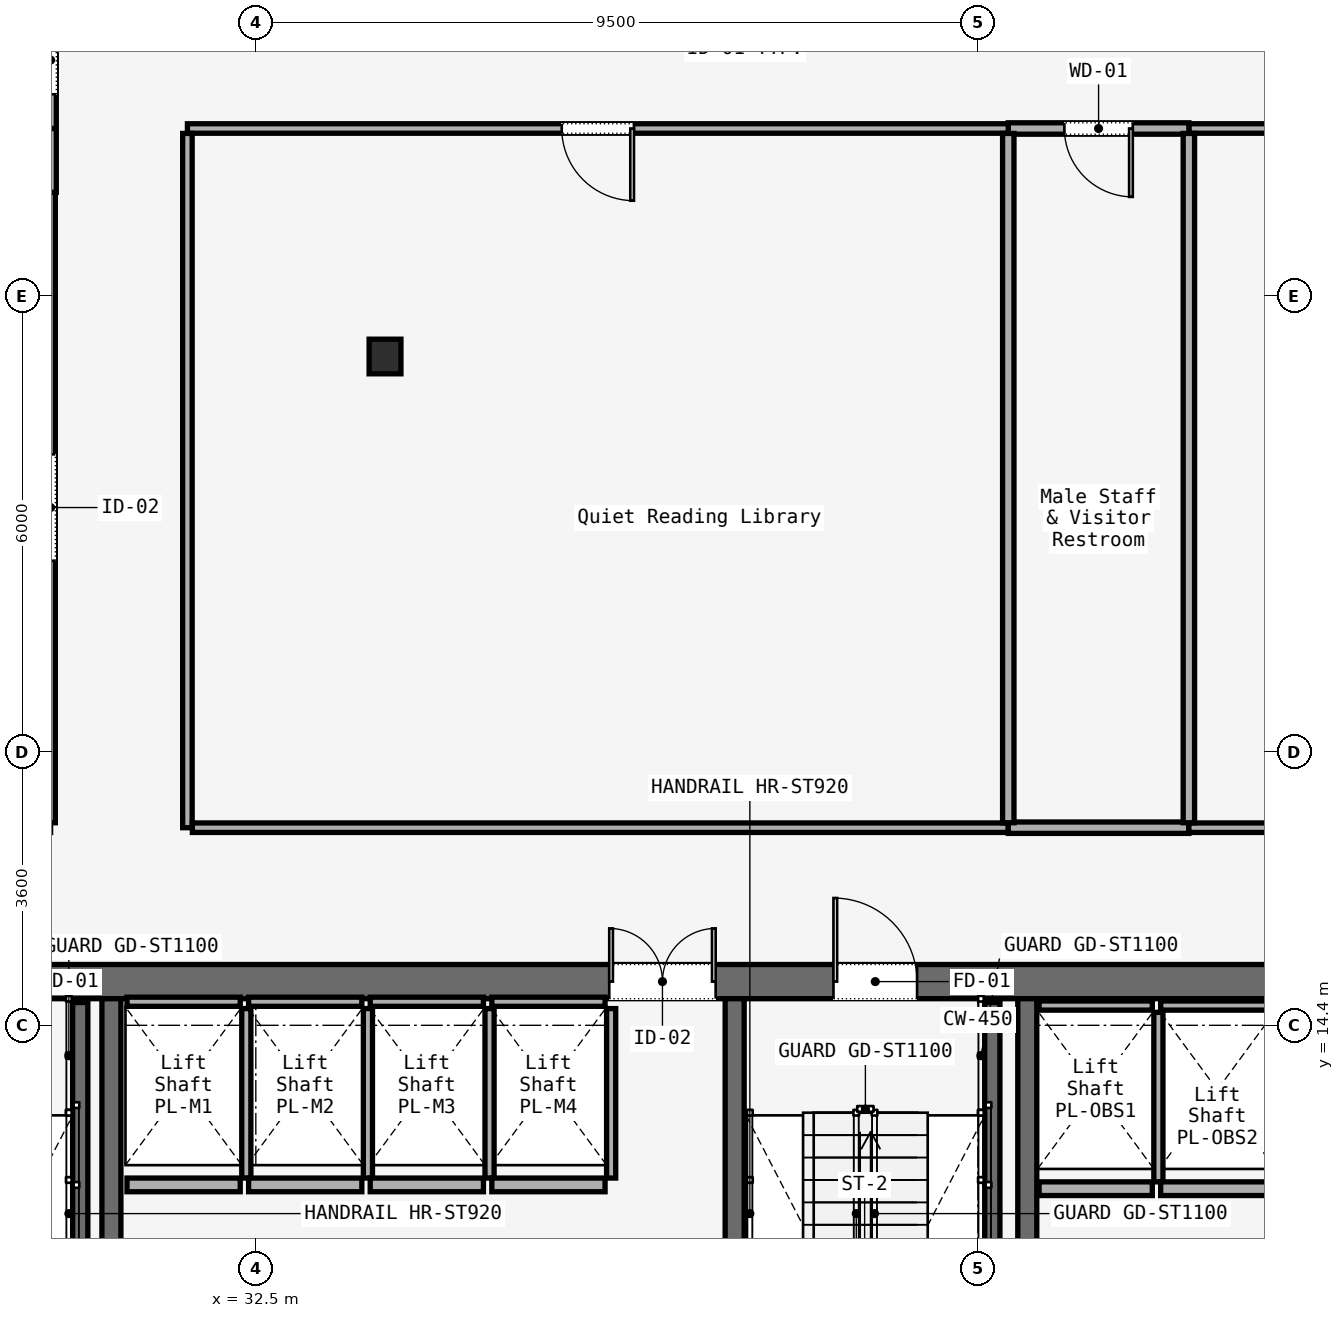
"""IFC4 building model, lengths in metres.
Left out: names, types, materials, properties, quantities, classifications, styles, units other than length and angle.
Written with IfcOpenShell. Run it as: python <this file> out.ifc"""

import sys

from ifc_helpers import new_model, si_unit, direction, frame, frame_2d, origin, origin_2d, place, context, subcontext, project, spatial, rectangle, i_section, extrude, element, fill, save


model = new_model("IFC4")
c1 = context("Model", 3, precision=1e-05, world=origin(), true_north=direction((0.0, 1.0)))
c2 = subcontext(c1, "Body", "Model", "MODEL_VIEW")
j1 = project(units=[si_unit("LENGTHUNIT", "METRE"), si_unit("PLANEANGLEUNIT", "RADIAN")], contexts=[c1])
p1 = place(None, origin())
s1 = spatial("IfcSite", under=j1, at=p1, CompositionType="ELEMENT")
p2 = place(p1, origin())
s2 = spatial("IfcBuilding", under=s1, at=p2, CompositionType="ELEMENT")
p3 = place(p2, frame((0.0, 0.0, 108.2)))
s3 = spatial("IfcBuildingStorey", under=s2, at=p3, CompositionType="ELEMENT", Elevation=108.2)
p4 = place(p3, frame((26.45, 14.975, 0.0), z_axis=(0.0, 0.0, 1.0), x_axis=(1.0, 0.0, 0.0)))
e1 = element("IfcWall", 1, at=p4, inside=s3, PredefinedType="SOLIDWALL", context=c2, shape_type="SweptSolid", body=[
    extrude(rectangle(XDim=31.1, YDim=0.45, at=frame_2d((15.55, 0.0))), origin(), (0.0, 0.0, 1.0), 3.52),
])
p5 = place(p4, frame((1.65, 0.0, 0.0)))
e2 = element("IfcOpeningElement", 2, at=p5, cuts=e1, PredefinedType="OPENING", context=c2, shape_type="SweptSolid", body=[
    extrude(rectangle(XDim=1.1, YDim=2.2, at=frame_2d((0.55, 1.1))), frame((0.0, 0.225, 0.0), z_axis=(0.0, -1.0, 0.0), x_axis=(1.0, 0.0, 0.0)), (0.0, 0.0, 1.0), 0.45),
])
p6 = place(p4, frame((13.65, 0.0, 0.0)))
e3 = element("IfcOpeningElement", 3, at=p6, cuts=e1, PredefinedType="OPENING", context=c2, shape_type="SweptSolid", body=[
    extrude(rectangle(XDim=1.1, YDim=2.2, at=frame_2d((0.55, 1.1))), frame((0.0, 0.225, 0.0), z_axis=(0.0, -1.0, 0.0), x_axis=(1.0, 0.0, 0.0)), (0.0, 0.0, 1.0), 0.45),
])
p7 = place(p4, frame((25.55, 0.0, 0.0)))
e4 = element("IfcOpeningElement", 4, at=p7, cuts=e1, PredefinedType="OPENING", context=c2, shape_type="SweptSolid", body=[
    extrude(rectangle(XDim=1.1, YDim=2.2, at=frame_2d((0.55, 1.1))), frame((0.0, 0.225, 0.0), z_axis=(0.0, -1.0, 0.0), x_axis=(1.0, 0.0, 0.0)), (0.0, 0.0, 1.0), 0.45),
])
p8 = place(p4, frame((10.7, 0.0, 0.0)))
e5 = element("IfcOpeningElement", 5, at=p8, cuts=e1, PredefinedType="OPENING", context=c2, shape_type="SweptSolid", body=[
    extrude(rectangle(XDim=1.4, YDim=2.2, at=frame_2d((0.7, 1.1))), frame((0.0, 0.225, 0.0), z_axis=(0.0, -1.0, 0.0), x_axis=(1.0, 0.0, 0.0)), (0.0, 0.0, 1.0), 0.45),
])
p9 = place(p4, frame((19.35, 0.0, 0.0)))
e6 = element("IfcOpeningElement", 6, at=p9, cuts=e1, PredefinedType="OPENING", context=c2, shape_type="SweptSolid", body=[
    extrude(rectangle(XDim=1.1, YDim=2.2, at=frame_2d((0.55, 1.1))), frame((0.0, 0.225, 0.0), z_axis=(0.0, -1.0, 0.0), x_axis=(1.0, 0.0, 0.0)), (0.0, 0.0, 1.0), 0.45),
])
p10 = place(p4, frame((21.4, 0.0, 0.0)))
e7 = element("IfcOpeningElement", 7, at=p10, cuts=e1, PredefinedType="OPENING", context=c2, shape_type="SweptSolid", body=[
    extrude(rectangle(XDim=0.9, YDim=2.1, at=frame_2d((0.45, 1.05))), frame((0.0, 0.225, 0.0), z_axis=(0.0, -1.0, 0.0), x_axis=(1.0, 0.0, 0.0)), (0.0, 0.0, 1.0), 0.45),
])
p11 = place(p4, frame((23.35, 0.0, 0.0)))
e8 = element("IfcOpeningElement", 8, at=p11, cuts=e1, PredefinedType="OPENING", context=c2, shape_type="SweptSolid", body=[
    extrude(rectangle(XDim=1.3, YDim=2.3, at=frame_2d((0.65, 1.15))), frame((0.0, 0.225, 0.0), z_axis=(0.0, -1.0, 0.0), x_axis=(1.0, 0.0, 0.0)), (0.0, 0.0, 1.0), 0.45),
])
for number, where, z_axis, x_axis in (
    (9, (30.6, 5.85, 0.0), (0.0, 0.0, 1.0), (0.0, 1.0, 0.0)),
    (10, (38.8, 5.85, 0.0), (0.0, 0.0, 1.0), (0.0, 1.0, 0.0)),
    (11, (42.65, 5.85, 0.0), (0.0, 0.0, 1.0), (0.0, 1.0, 0.0)),
):
    element("IfcWall", number, at=place(p3, frame(where, z_axis=z_axis, x_axis=x_axis)), inside=s3, PredefinedType="SOLIDWALL", context=c2, shape_type="SweptSolid", body=[
        extrude(rectangle(XDim=8.9, YDim=0.25, at=frame_2d((4.45, 0.0))), origin(), (0.0, 0.0, 1.0), 3.52),
    ])
p12 = place(p3, frame((34.2, 23.2, 0.0), z_axis=(0.0, 0.0, 1.0), x_axis=(1.0, 0.0, 0.0)))
e12 = element("IfcColumn", 12, at=p12, inside=s3, PredefinedType="COLUMN", context=c2, shape_type="SweptSolid", body=[
    extrude(i_section(OverallWidth=0.418, OverallDepth=0.456, WebThickness=0.042, FlangeThickness=0.067, FilletRadius=0.015, at=origin_2d()), origin(), (0.0, 0.0, 1.0), 3.52),
])
for number, where, z_axis, x_axis in (
    (13, (30.19, 14.7, 0.0), (0.0, 0.0, 1.0), (0.0, -1.0, 0.0)),
    (14, (42.19, 14.7, 0.0), (0.0, 0.0, 1.0), (0.0, -1.0, 0.0)),
):
    element("IfcWall", number, at=place(p3, frame(where, z_axis=z_axis, x_axis=x_axis)), inside=s3, PredefinedType="SOLIDWALL", context=c2, shape_type="SweptSolid", body=[
        extrude(rectangle(XDim=7.65, YDim=0.2, at=frame_2d((3.825, 0.0))), origin(), (0.0, 0.0, 1.0), 3.8),
    ])
p13 = place(p3, frame((30.805, 12.3, 0.0), z_axis=(0.0, 0.0, 1.0), x_axis=(1.0, 0.0, 0.0)))
e15 = element("IfcWall", 15, at=p13, inside=s3, PredefinedType="SOLIDWALL", context=c2, shape_type="SweptSolid", body=[
    extrude(rectangle(XDim=1.49, YDim=0.18, at=frame_2d((0.745, 0.0))), origin(), (0.0, 0.0, 1.0), 2.95),
])
p14 = place(p3, frame((30.805, 14.71, 0.0), z_axis=(0.0, 0.0, 1.0), x_axis=(1.0, 0.0, 0.0)))
e16 = element("IfcWall", 16, at=p14, inside=s3, PredefinedType="SOLIDWALL", context=c2, shape_type="SweptSolid", body=[
    extrude(rectangle(XDim=1.49, YDim=0.12, at=frame_2d((0.745, 0.0))), origin(), (0.0, 0.0, 1.0), 2.95),
])
p15 = place(p3, frame((32.375, 12.39, 0.0), z_axis=(0.0, 0.0, 1.0), x_axis=(0.0, 1.0, 0.0)))
e17 = element("IfcWall", 17, at=p15, inside=s3, PredefinedType="SOLIDWALL", context=c2, shape_type="SweptSolid", body=[
    extrude(rectangle(XDim=2.23, YDim=0.12, at=frame_2d((1.115, 0.0))), origin(), (0.0, 0.0, 1.0), 2.95),
])
p16 = place(p3, frame((32.405, 12.3, 0.0), z_axis=(0.0, 0.0, 1.0), x_axis=(1.0, 0.0, 0.0)))
e18 = element("IfcWall", 18, at=p16, inside=s3, PredefinedType="SOLIDWALL", context=c2, shape_type="SweptSolid", body=[
    extrude(rectangle(XDim=1.49, YDim=0.18, at=frame_2d((0.745, 0.0))), origin(), (0.0, 0.0, 1.0), 2.95),
])
p17 = place(p3, frame((32.405, 14.71, 0.0), z_axis=(0.0, 0.0, 1.0), x_axis=(1.0, 0.0, 0.0)))
e19 = element("IfcWall", 19, at=p17, inside=s3, PredefinedType="SOLIDWALL", context=c2, shape_type="SweptSolid", body=[
    extrude(rectangle(XDim=1.49, YDim=0.12, at=frame_2d((0.745, 0.0))), origin(), (0.0, 0.0, 1.0), 2.95),
])
p18 = place(p3, frame((33.975, 12.39, 0.0), z_axis=(0.0, 0.0, 1.0), x_axis=(0.0, 1.0, 0.0)))
e20 = element("IfcWall", 20, at=p18, inside=s3, PredefinedType="SOLIDWALL", context=c2, shape_type="SweptSolid", body=[
    extrude(rectangle(XDim=2.23, YDim=0.12, at=frame_2d((1.115, 0.0))), origin(), (0.0, 0.0, 1.0), 2.95),
])
p19 = place(p3, frame((34.005, 12.3, 0.0), z_axis=(0.0, 0.0, 1.0), x_axis=(1.0, 0.0, 0.0)))
e21 = element("IfcWall", 21, at=p19, inside=s3, PredefinedType="SOLIDWALL", context=c2, shape_type="SweptSolid", body=[
    extrude(rectangle(XDim=1.49, YDim=0.18, at=frame_2d((0.745, 0.0))), origin(), (0.0, 0.0, 1.0), 2.95),
])
p20 = place(p3, frame((34.005, 14.71, 0.0), z_axis=(0.0, 0.0, 1.0), x_axis=(1.0, 0.0, 0.0)))
e22 = element("IfcWall", 22, at=p20, inside=s3, PredefinedType="SOLIDWALL", context=c2, shape_type="SweptSolid", body=[
    extrude(rectangle(XDim=1.49, YDim=0.12, at=frame_2d((0.745, 0.0))), origin(), (0.0, 0.0, 1.0), 2.95),
])
p21 = place(p3, frame((35.575, 12.39, 0.0), z_axis=(0.0, 0.0, 1.0), x_axis=(0.0, 1.0, 0.0)))
e23 = element("IfcWall", 23, at=p21, inside=s3, PredefinedType="SOLIDWALL", context=c2, shape_type="SweptSolid", body=[
    extrude(rectangle(XDim=2.23, YDim=0.12, at=frame_2d((1.115, 0.0))), origin(), (0.0, 0.0, 1.0), 2.95),
])
p22 = place(p3, frame((35.605, 12.3, 0.0), z_axis=(0.0, 0.0, 1.0), x_axis=(1.0, 0.0, 0.0)))
e24 = element("IfcWall", 24, at=p22, inside=s3, PredefinedType="SOLIDWALL", context=c2, shape_type="SweptSolid", body=[
    extrude(rectangle(XDim=1.49, YDim=0.18, at=frame_2d((0.745, 0.0))), origin(), (0.0, 0.0, 1.0), 2.95),
])
p23 = place(p3, frame((35.605, 14.71, 0.0), z_axis=(0.0, 0.0, 1.0), x_axis=(1.0, 0.0, 0.0)))
e25 = element("IfcWall", 25, at=p23, inside=s3, PredefinedType="SOLIDWALL", context=c2, shape_type="SweptSolid", body=[
    extrude(rectangle(XDim=1.49, YDim=0.12, at=frame_2d((0.745, 0.0))), origin(), (0.0, 0.0, 1.0), 2.95),
])
p24 = place(p3, frame((37.175, 12.39, 0.0), z_axis=(0.0, 0.0, 1.0), x_axis=(0.0, 1.0, 0.0)))
e26 = element("IfcWall", 26, at=p24, inside=s3, PredefinedType="SOLIDWALL", context=c2, shape_type="SweptSolid", body=[
    extrude(rectangle(XDim=2.23, YDim=0.12, at=frame_2d((1.115, 0.0))), origin(), (0.0, 0.0, 1.0), 2.95),
])
p25 = place(p3, frame((42.805, 12.25, 0.0), z_axis=(0.0, 0.0, 1.0), x_axis=(1.0, 0.0, 0.0)))
e27 = element("IfcWall", 27, at=p25, inside=s3, PredefinedType="SOLIDWALL", context=c2, shape_type="SweptSolid", body=[
    extrude(rectangle(XDim=1.49, YDim=0.18, at=frame_2d((0.745, 0.0))), origin(), (0.0, 0.0, 1.0), 2.95),
])
p26 = place(p3, frame((42.805, 14.66, 0.0), z_axis=(0.0, 0.0, 1.0), x_axis=(1.0, 0.0, 0.0)))
e28 = element("IfcWall", 28, at=p26, inside=s3, PredefinedType="SOLIDWALL", context=c2, shape_type="SweptSolid", body=[
    extrude(rectangle(XDim=1.49, YDim=0.12, at=frame_2d((0.745, 0.0))), origin(), (0.0, 0.0, 1.0), 2.95),
])
p27 = place(p3, frame((44.375, 12.34, 0.0), z_axis=(0.0, 0.0, 1.0), x_axis=(0.0, 1.0, 0.0)))
e29 = element("IfcWall", 29, at=p27, inside=s3, PredefinedType="SOLIDWALL", context=c2, shape_type="SweptSolid", body=[
    extrude(rectangle(XDim=2.23, YDim=0.12, at=frame_2d((1.115, 0.0))), origin(), (0.0, 0.0, 1.0), 2.95),
])
p28 = place(p3, frame((44.405, 12.25, 0.0), z_axis=(0.0, 0.0, 1.0), x_axis=(1.0, 0.0, 0.0)))
e30 = element("IfcWall", 30, at=p28, inside=s3, PredefinedType="SOLIDWALL", context=c2, shape_type="SweptSolid", body=[
    extrude(rectangle(XDim=1.49, YDim=0.18, at=frame_2d((0.745, 0.0))), origin(), (0.0, 0.0, 1.0), 2.95),
])
p29 = place(p3, frame((44.405, 14.66, 0.0), z_axis=(0.0, 0.0, 1.0), x_axis=(1.0, 0.0, 0.0)))
e31 = element("IfcWall", 31, at=p29, inside=s3, PredefinedType="SOLIDWALL", context=c2, shape_type="SweptSolid", body=[
    extrude(rectangle(XDim=1.49, YDim=0.12, at=frame_2d((0.745, 0.0))), origin(), (0.0, 0.0, 1.0), 2.95),
])
p30 = place(p3, frame((29.8, 17.065, 0.0), z_axis=(0.0, 0.0, 1.0), x_axis=(0.0, 1.0, 0.0)))
e32 = element("IfcWall", 32, at=p30, inside=s3, PredefinedType="PARTITIONING", context=c2, shape_type="SweptSolid", body=[
    extrude(rectangle(XDim=8.295, YDim=0.125, at=frame_2d((4.147, 0.0))), origin(), (0.0, 0.0, 1.0), 2.95),
])
p31 = place(p30, frame((3.448, 0.0, 0.0)))
e33 = element("IfcOpeningElement", 33, at=p31, cuts=e32, PredefinedType="OPENING", context=c2, shape_type="SweptSolid", body=[
    extrude(rectangle(XDim=1.4, YDim=2.2, at=frame_2d((0.7, 1.1))), frame((0.0, 0.062, 0.0), z_axis=(0.0, -1.0, 0.0), x_axis=(1.0, 0.0, 0.0)), (0.0, 0.0, 1.0), 0.125),
])
p32 = place(p3, frame((29.8, 25.36, 0.0), z_axis=(0.0, 0.0, 1.0), x_axis=(0.0, 1.0, 0.0)))
e34 = element("IfcWall", 34, at=p32, inside=s3, PredefinedType="PARTITIONING", context=c2, shape_type="SweptSolid", body=[
    extrude(rectangle(XDim=0.84, YDim=0.15, at=frame_2d((0.42, 0.0))), origin(), (0.0, 0.0, 1.0), 2.95),
])
p33 = place(p3, frame((29.8, 26.2, 0.0), z_axis=(0.0, 0.0, 1.0), x_axis=(0.0, 1.0, 0.0)))
e35 = element("IfcWall", 35, at=p33, inside=s3, PredefinedType="PARTITIONING", context=c2, shape_type="SweptSolid", body=[
    extrude(rectangle(XDim=1.8, YDim=0.15, at=frame_2d((0.9, 0.0))), origin(), (0.0, 0.0, 1.0), 2.95),
])
p34 = place(p33, frame((0.45, 0.0, 0.0)))
e36 = element("IfcOpeningElement", 36, at=p34, cuts=e35, PredefinedType="OPENING", context=c2, shape_type="SweptSolid", body=[
    extrude(rectangle(XDim=0.9, YDim=2.15, at=frame_2d((0.45, 1.075))), frame((0.0, 0.075, 0.0), z_axis=(0.0, -1.0, 0.0), x_axis=(1.0, 0.0, 0.0)), (0.0, 0.0, 1.0), 0.15),
])
p35 = place(p3, frame((55.535, 26.2, 0.0), z_axis=(0.0, 0.0, 1.0), x_axis=(-1.0, 0.0, 0.0)))
e37 = element("IfcWall", 37, at=p35, inside=s3, PredefinedType="PARTITIONING", context=c2, shape_type="SweptSolid", body=[
    extrude(rectangle(XDim=10.759, YDim=0.125, at=frame_2d((5.379, 0.0))), origin(), (0.0, 0.0, 1.0), 2.95),
])
p36 = place(p3, frame((44.776, 26.2, 0.0), z_axis=(0.0, 0.0, 1.0), x_axis=(-1.0, 0.0, 0.0)))
e38 = element("IfcWall", 38, at=p36, inside=s3, PredefinedType="PARTITIONING", context=c2, shape_type="SweptSolid", body=[
    extrude(rectangle(XDim=2.376, YDim=0.15, at=frame_2d((1.188, 0.0))), origin(), (0.0, 0.0, 1.0), 2.95),
])
p37 = place(p36, frame((0.738, 0.0, 0.0)))
e39 = element("IfcOpeningElement", 39, at=p37, cuts=e38, PredefinedType="OPENING", context=c2, shape_type="SweptSolid", body=[
    extrude(rectangle(XDim=0.9, YDim=2.15, at=frame_2d((0.45, 1.075))), frame((0.0, 0.075, 0.0), z_axis=(0.0, -1.0, 0.0), x_axis=(1.0, 0.0, 0.0)), (0.0, 0.0, 1.0), 0.15),
])
p38 = place(p3, frame((42.4, 26.2, 0.0), z_axis=(0.0, 0.0, 1.0), x_axis=(-1.0, 0.0, 0.0)))
e40 = element("IfcWall", 40, at=p38, inside=s3, PredefinedType="PARTITIONING", context=c2, shape_type="SweptSolid", body=[
    extrude(rectangle(XDim=10.8, YDim=0.125, at=frame_2d((5.4, 0.0))), origin(), (0.0, 0.0, 1.0), 2.95),
])
p39 = place(p38, frame((4.925, 0.0, 0.0)))
e41 = element("IfcOpeningElement", 41, at=p39, cuts=e40, PredefinedType="OPENING", context=c2, shape_type="SweptSolid", body=[
    extrude(rectangle(XDim=0.95, YDim=2.2, at=frame_2d((0.475, 1.1))), frame((0.0, 0.062, 0.0), z_axis=(0.0, -1.0, 0.0), x_axis=(1.0, 0.0, 0.0)), (0.0, 0.0, 1.0), 0.125),
])
p40 = place(p3, frame((31.6, 26.135, 0.0), z_axis=(0.0, 0.0, 1.0), x_axis=(0.0, -1.0, 0.0)))
e42 = element("IfcWall", 42, at=p40, inside=s3, PredefinedType="PARTITIONING", context=c2, shape_type="SweptSolid", body=[
    extrude(rectangle(XDim=9.135, YDim=0.125, at=frame_2d((4.567, 0.0))), origin(), (0.0, 0.0, 1.0), 2.95),
])
p41 = place(p3, frame((31.665, 17.0, 0.0), z_axis=(0.0, 0.0, 1.0), x_axis=(1.0, 0.0, 0.0)))
e43 = element("IfcWall", 43, at=p41, inside=s3, PredefinedType="PARTITIONING", context=c2, shape_type="SweptSolid", body=[
    extrude(rectangle(XDim=10.735, YDim=0.125, at=frame_2d((5.367, 0.0))), origin(), (0.0, 0.0, 1.0), 2.95),
])
p42 = place(p3, frame((42.4, 17.0, 0.0), z_axis=(0.0, 0.0, 1.0), x_axis=(1.0, 0.0, 0.0)))
e44 = element("IfcWall", 44, at=p42, inside=s3, PredefinedType="PARTITIONING", context=c2, shape_type="SweptSolid", body=[
    extrude(rectangle(XDim=2.376, YDim=0.15, at=frame_2d((1.188, 0.0))), origin(), (0.0, 0.0, 1.0), 2.95),
])
p43 = place(p3, frame((44.776, 17.0, 0.0), z_axis=(0.0, 0.0, 1.0), x_axis=(1.0, 0.0, 0.0)))
e45 = element("IfcWall", 45, at=p43, inside=s3, PredefinedType="PARTITIONING", context=c2, shape_type="SweptSolid", body=[
    extrude(rectangle(XDim=10.824, YDim=0.125, at=frame_2d((5.412, 0.0))), origin(), (0.0, 0.0, 1.0), 2.95),
])
p44 = place(p43, frame((4.937, 0.0, 0.0)))
e46 = element("IfcOpeningElement", 46, at=p44, cuts=e45, PredefinedType="OPENING", context=c2, shape_type="SweptSolid", body=[
    extrude(rectangle(XDim=0.95, YDim=2.2, at=frame_2d((0.475, 1.1))), frame((0.0, 0.062, 0.0), z_axis=(0.0, -1.0, 0.0), x_axis=(1.0, 0.0, 0.0)), (0.0, 0.0, 1.0), 0.125),
])
for number, where, z_axis, x_axis in (
    (47, (42.4, 26.135, 0.0), (0.0, 0.0, 1.0), (0.0, -1.0, 0.0)),
    (48, (44.776, 26.135, 0.0), (0.0, 0.0, 1.0), (0.0, -1.0, 0.0)),
):
    element("IfcWall", number, at=place(p3, frame(where, z_axis=z_axis, x_axis=x_axis)), inside=s3, PredefinedType="PARTITIONING", context=c2, shape_type="SweptSolid", body=[
        extrude(rectangle(XDim=9.07, YDim=0.15, at=frame_2d((4.535, 0.0))), origin(), (0.0, 0.0, 1.0), 2.95),
    ])
p45 = place(p6, origin())
e49 = element("IfcDoor", 49, at=p45, inside=s3, OperationType="SINGLE_SWING_LEFT", PredefinedType="DOOR", context=c2, shape_type="SweptSolid", body=[
    extrude(rectangle(XDim=1.1, YDim=2.2, at=frame_2d((0.55, 1.1))), frame((0.0, 0.025, 0.0), z_axis=(0.0, -1.0, 0.0), x_axis=(1.0, 0.0, 0.0)), (0.0, 0.0, 1.0), 0.05),
])
fill(e3, e49)
p46 = place(p8, origin())
e50 = element("IfcDoor", 50, at=p46, inside=s3, OperationType="DOUBLE_DOOR_SINGLE_SWING", PredefinedType="DOOR", context=c2, shape_type="SweptSolid", body=[
    extrude(rectangle(XDim=1.4, YDim=2.2, at=frame_2d((0.7, 1.1))), frame((0.0, 0.025, 0.0), z_axis=(0.0, -1.0, 0.0), x_axis=(1.0, 0.0, 0.0)), (0.0, 0.0, 1.0), 0.05),
])
fill(e5, e50)
p47 = place(p31, origin())
e51 = element("IfcDoor", 51, at=p47, inside=s3, OperationType="SINGLE_SWING_RIGHT", PredefinedType="DOOR", context=c2, shape_type="SweptSolid", body=[
    extrude(rectangle(XDim=1.4, YDim=2.2, at=frame_2d((0.7, 1.1))), frame((0.0, 0.025, 0.0), z_axis=(0.0, -1.0, 0.0), x_axis=(1.0, 0.0, 0.0)), (0.0, 0.0, 1.0), 0.05),
])
fill(e33, e51)
p48 = place(p39, origin())
e52 = element("IfcDoor", 52, at=p48, inside=s3, OperationType="SINGLE_SWING_LEFT", PredefinedType="DOOR", context=c2, shape_type="SweptSolid", body=[
    extrude(rectangle(XDim=0.95, YDim=2.2, at=frame_2d((0.475, 1.1))), frame((0.0, 0.025, 0.0), z_axis=(0.0, -1.0, 0.0), x_axis=(1.0, 0.0, 0.0)), (0.0, 0.0, 1.0), 0.05),
])
fill(e41, e52)
p49 = place(p37, origin())
e53 = element("IfcDoor", 53, at=p49, inside=s3, OperationType="SINGLE_SWING_RIGHT", PredefinedType="DOOR", context=c2, shape_type="SweptSolid", body=[
    extrude(rectangle(XDim=0.9, YDim=2.15, at=frame_2d((0.45, 1.075))), frame((0.0, 0.025, 0.0), z_axis=(0.0, -1.0, 0.0), x_axis=(1.0, 0.0, 0.0)), (0.0, 0.0, 1.0), 0.05),
])
fill(e39, e53)
p50 = place(p34, origin())
e54 = element("IfcDoor", 54, at=p50, inside=s3, OperationType="SINGLE_SWING_LEFT", PredefinedType="DOOR", context=c2, shape_type="SweptSolid", body=[
    extrude(rectangle(XDim=0.9, YDim=2.15, at=frame_2d((0.45, 1.075))), frame((0.0, 0.025, 0.0), z_axis=(0.0, -1.0, 0.0), x_axis=(1.0, 0.0, 0.0)), (0.0, 0.0, 1.0), 0.05),
])
fill(e36, e54)
save(model, sys.argv[1])
